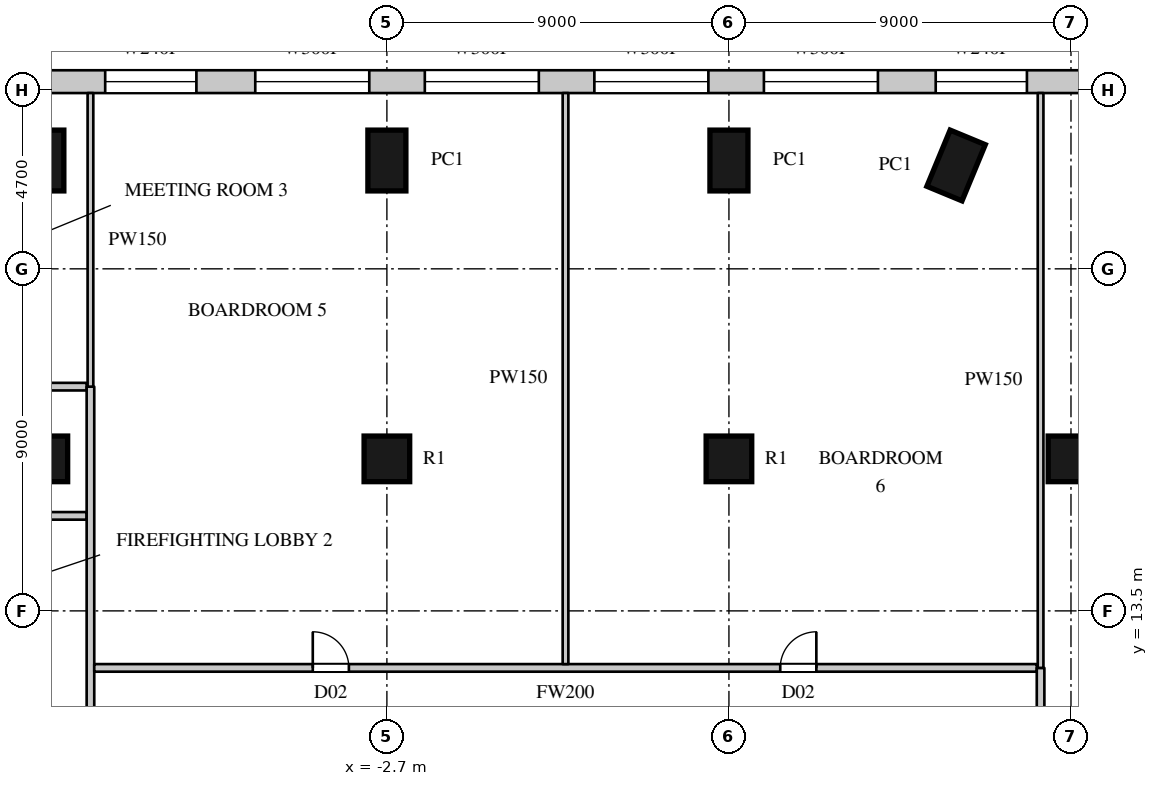
"""IFC4 building model, lengths in metres.
Left out: names, types, materials, properties, quantities, classifications, styles, units other than length and angle.
Written with IfcOpenShell. Run it as: python <this file> out.ifc"""

import sys

from ifc_helpers import new_model, si_unit, direction, frame, frame_2d, origin, origin_2d, place, context, subcontext, project, spatial, rectangle, circle, extrude, element, fill, save


model = new_model("IFC4")
c1 = context("Model", 3, precision=1e-05, world=origin(), true_north=direction((0.0, 1.0)))
c2 = subcontext(c1, "Body", "Model", "MODEL_VIEW")
j1 = project(units=[si_unit("LENGTHUNIT", "METRE"), si_unit("PLANEANGLEUNIT", "RADIAN")], contexts=[c1])
p1 = place(None, origin())
s1 = spatial("IfcSite", under=j1, at=p1, CompositionType="ELEMENT")
p2 = place(p1, origin())
s2 = spatial("IfcBuilding", under=s1, at=p2, CompositionType="ELEMENT")
p3 = place(p2, frame((0.0, 0.0, 44.0)))
s3 = spatial("IfcBuildingStorey", under=s2, at=p3, CompositionType="ELEMENT", Elevation=44.0)
for number, where, z_axis, x_axis in (
    (1, (12.277, 25.219, 0.0), (0.0, 0.0, 1.0), (-0.924, 0.383, 0.0)),
    (2, (6.3, 25.35, 0.0), (0.0, 0.0, 1.0), (-1.0, 0.0, 0.0)),
    (3, (-2.7, 25.35, 0.0), (0.0, 0.0, 1.0), (-1.0, 0.0, 0.0)),
    (4, (-11.7, 25.35, 0.0), (0.0, 0.0, 1.0), (-1.0, 0.0, 0.0)),
):
    element("IfcColumn", number, at=place(p3, frame(where, z_axis=z_axis, x_axis=x_axis)), inside=s3, PredefinedType="COLUMN", context=c2, shape_type="SweptSolid", body=[
        extrude(rectangle(XDim=1.0, YDim=1.6, at=origin_2d()), origin(), (0.0, 0.0, 1.0), 6.0),
    ])
for number, where, z_axis, x_axis in (
    (5, (-11.7, 17.5, 0.0), (0.0, 0.0, 1.0), (1.0, 0.0, 0.0)),
    (6, (-2.7, 17.5, 0.0), (0.0, 0.0, 1.0), (1.0, 0.0, 0.0)),
    (7, (6.3, 17.5, 0.0), (0.0, 0.0, 1.0), (1.0, 0.0, 0.0)),
    (8, (15.3, 17.5, 0.0), (0.0, 0.0, 1.0), (1.0, 0.0, 0.0)),
):
    element("IfcColumn", number, at=place(p3, frame(where, z_axis=z_axis, x_axis=x_axis)), inside=s3, PredefinedType="COLUMN", context=c2, shape_type="SweptSolid", body=[
        extrude(circle(Radius=0.6, at=origin_2d()), origin(), (0.0, 0.0, 1.0), 6.0),
    ])
p4 = place(p3, frame((24.334, 27.425, 0.0), z_axis=(0.0, 0.0, 1.0), x_axis=(-1.0, 0.0, 0.0)))
e9 = element("IfcWall", 9, at=p4, inside=s3, PredefinedType="ELEMENTEDWALL", context=c2, shape_type="SweptSolid", body=[
    extrude(rectangle(XDim=53.534, YDim=0.6, at=frame_2d((26.767, 0.0))), origin(), (0.0, 0.0, 1.0), 5.596),
])
p5 = place(p4, frame((0.731, 0.0, 1.2)))
e10 = element("IfcOpeningElement", 10, at=p5, cuts=e9, PredefinedType="OPENING", context=c2, shape_type="SweptSolid", body=[
    extrude(rectangle(XDim=3.0, YDim=2.4, at=frame_2d((1.5, 1.2))), frame((0.0, 0.31, 0.0), z_axis=(0.0, -1.0, 0.0), x_axis=(1.0, 0.0, 0.0)), (0.0, 0.0, 1.0), 0.62),
])
p6 = place(p4, frame((5.192, 0.0, 1.2)))
e11 = element("IfcOpeningElement", 11, at=p6, cuts=e9, PredefinedType="OPENING", context=c2, shape_type="SweptSolid", body=[
    extrude(rectangle(XDim=3.0, YDim=2.4, at=frame_2d((1.5, 1.2))), frame((0.0, 0.31, 0.0), z_axis=(0.0, -1.0, 0.0), x_axis=(1.0, 0.0, 0.0)), (0.0, 0.0, 1.0), 0.62),
])
p7 = place(p4, frame((14.114, 0.0, 1.2)))
e12 = element("IfcOpeningElement", 12, at=p7, cuts=e9, PredefinedType="OPENING", context=c2, shape_type="SweptSolid", body=[
    extrude(rectangle(XDim=3.0, YDim=2.4, at=frame_2d((1.5, 1.2))), frame((0.0, 0.31, 0.0), z_axis=(0.0, -1.0, 0.0), x_axis=(1.0, 0.0, 0.0)), (0.0, 0.0, 1.0), 0.62),
])
p8 = place(p4, frame((18.575, 0.0, 1.2)))
e13 = element("IfcOpeningElement", 13, at=p8, cuts=e9, PredefinedType="OPENING", context=c2, shape_type="SweptSolid", body=[
    extrude(rectangle(XDim=3.0, YDim=2.4, at=frame_2d((1.5, 1.2))), frame((0.0, 0.31, 0.0), z_axis=(0.0, -1.0, 0.0), x_axis=(1.0, 0.0, 0.0)), (0.0, 0.0, 1.0), 0.62),
])
p9 = place(p4, frame((23.037, 0.0, 1.2)))
e14 = element("IfcOpeningElement", 14, at=p9, cuts=e9, PredefinedType="OPENING", context=c2, shape_type="SweptSolid", body=[
    extrude(rectangle(XDim=3.0, YDim=2.4, at=frame_2d((1.5, 1.2))), frame((0.0, 0.31, 0.0), z_axis=(0.0, -1.0, 0.0), x_axis=(1.0, 0.0, 0.0)), (0.0, 0.0, 1.0), 0.62),
])
p10 = place(p4, frame((27.498, 0.0, 1.2)))
e15 = element("IfcOpeningElement", 15, at=p10, cuts=e9, PredefinedType="OPENING", context=c2, shape_type="SweptSolid", body=[
    extrude(rectangle(XDim=3.0, YDim=2.4, at=frame_2d((1.5, 1.2))), frame((0.0, 0.31, 0.0), z_axis=(0.0, -1.0, 0.0), x_axis=(1.0, 0.0, 0.0)), (0.0, 0.0, 1.0), 0.62),
])
p11 = place(p4, frame((45.343, 0.0, 1.2)))
e16 = element("IfcOpeningElement", 16, at=p11, cuts=e9, PredefinedType="OPENING", context=c2, shape_type="SweptSolid", body=[
    extrude(rectangle(XDim=3.0, YDim=2.4, at=frame_2d((1.5, 1.2))), frame((0.0, 0.31, 0.0), z_axis=(0.0, -1.0, 0.0), x_axis=(1.0, 0.0, 0.0)), (0.0, 0.0, 1.0), 0.62),
])
p12 = place(p4, frame((49.804, 0.0, 1.2)))
e17 = element("IfcOpeningElement", 17, at=p12, cuts=e9, PredefinedType="OPENING", context=c2, shape_type="SweptSolid", body=[
    extrude(rectangle(XDim=3.0, YDim=2.4, at=frame_2d((1.5, 1.2))), frame((0.0, 0.31, 0.0), z_axis=(0.0, -1.0, 0.0), x_axis=(1.0, 0.0, 0.0)), (0.0, 0.0, 1.0), 0.62),
])
p13 = place(p4, frame((10.194, 0.0, 1.2)))
e18 = element("IfcOpeningElement", 18, at=p13, cuts=e9, PredefinedType="OPENING", context=c2, shape_type="SweptSolid", body=[
    extrude(rectangle(XDim=2.4, YDim=2.4, at=frame_2d((1.2, 1.2))), frame((0.0, 0.31, 0.0), z_axis=(0.0, -1.0, 0.0), x_axis=(1.0, 0.0, 0.0)), (0.0, 0.0, 1.0), 0.62),
])
p14 = place(p4, frame((32.047, 0.0, 1.2)))
e19 = element("IfcOpeningElement", 19, at=p14, cuts=e9, PredefinedType="OPENING", context=c2, shape_type="SweptSolid", body=[
    extrude(rectangle(XDim=2.4, YDim=2.4, at=frame_2d((1.2, 1.2))), frame((0.0, 0.31, 0.0), z_axis=(0.0, -1.0, 0.0), x_axis=(1.0, 0.0, 0.0)), (0.0, 0.0, 1.0), 0.62),
])
p15 = place(p4, frame((36.461, 0.0, 1.2)))
e20 = element("IfcOpeningElement", 20, at=p15, cuts=e9, PredefinedType="OPENING", context=c2, shape_type="SweptSolid", body=[
    extrude(rectangle(XDim=1.2, YDim=2.4, at=frame_2d((0.6, 1.2))), frame((0.0, 0.31, 0.0), z_axis=(0.0, -1.0, 0.0), x_axis=(1.0, 0.0, 0.0)), (0.0, 0.0, 1.0), 0.62),
])
p16 = place(p4, frame((38.411, 0.0, 1.2)))
e21 = element("IfcOpeningElement", 21, at=p16, cuts=e9, PredefinedType="OPENING", context=c2, shape_type="SweptSolid", body=[
    extrude(rectangle(XDim=0.9, YDim=2.4, at=frame_2d((0.45, 1.2))), frame((0.0, 0.31, 0.0), z_axis=(0.0, -1.0, 0.0), x_axis=(1.0, 0.0, 0.0)), (0.0, 0.0, 1.0), 0.62),
])
p17 = place(p4, frame((41.475, 0.0, 1.2)))
e22 = element("IfcOpeningElement", 22, at=p17, cuts=e9, PredefinedType="OPENING", context=c2, shape_type="SweptSolid", body=[
    extrude(rectangle(XDim=2.4, YDim=2.4, at=frame_2d((1.2, 1.2))), frame((0.0, 0.31, 0.0), z_axis=(0.0, -1.0, 0.0), x_axis=(1.0, 0.0, 0.0)), (0.0, 0.0, 1.0), 0.62),
])
p18 = place(p3, frame((-23.687, 19.4, 0.0), z_axis=(0.0, 0.0, 1.0), x_axis=(1.0, 0.0, 0.0)))
e23 = element("IfcWall", 23, at=p18, inside=s3, PredefinedType="PARTITIONING", context=c2, shape_type="SweptSolid", body=[
    extrude(rectangle(XDim=13.086, YDim=0.2, at=frame_2d((6.543, 0.0))), origin(), (0.0, 0.0, 1.0), 5.596),
])
p19 = place(p18, frame((4.8, 0.0, 0.0)))
e24 = element("IfcOpeningElement", 24, at=p19, cuts=e23, PredefinedType="OPENING", context=c2, shape_type="SweptSolid", body=[
    extrude(rectangle(XDim=0.95, YDim=2.2, at=frame_2d((0.475, 1.1))), frame((0.0, 0.11, 0.0), z_axis=(0.0, -1.0, 0.0), x_axis=(1.0, 0.0, 0.0)), (0.0, 0.0, 1.0), 0.22),
])
p20 = place(p18, frame((7.95, 0.0, 0.0)))
e25 = element("IfcOpeningElement", 25, at=p20, cuts=e23, PredefinedType="OPENING", context=c2, shape_type="SweptSolid", body=[
    extrude(rectangle(XDim=0.95, YDim=2.2, at=frame_2d((0.475, 1.1))), frame((0.0, 0.11, 0.0), z_axis=(0.0, -1.0, 0.0), x_axis=(1.0, 0.0, 0.0)), (0.0, 0.0, 1.0), 0.22),
])
p21 = place(p18, frame((11.0, 0.0, 0.0)))
e26 = element("IfcOpeningElement", 26, at=p21, cuts=e23, PredefinedType="OPENING", context=c2, shape_type="SweptSolid", body=[
    extrude(rectangle(XDim=0.95, YDim=2.2, at=frame_2d((0.475, 1.1))), frame((0.0, 0.11, 0.0), z_axis=(0.0, -1.0, 0.0), x_axis=(1.0, 0.0, 0.0)), (0.0, 0.0, 1.0), 0.22),
])
p22 = place(p3, frame((-13.97, 16.0, 0.0), z_axis=(0.0, 0.0, 1.0), x_axis=(1.0, 0.0, 0.0)))
e27 = element("IfcWall", 27, at=p22, inside=s3, PredefinedType="PARTITIONING", context=c2, shape_type="SweptSolid", body=[
    extrude(rectangle(XDim=3.37, YDim=0.2, at=frame_2d((1.685, 0.0))), origin(), (0.0, 0.0, 1.0), 5.596),
])
p23 = place(p3, frame((-10.5, -19.4, 0.0), z_axis=(0.0, 0.0, 1.0), x_axis=(0.0, 1.0, 0.0)))
e28 = element("IfcWall", 28, at=p23, inside=s3, PredefinedType="PARTITIONING", context=c2, shape_type="SweptSolid", body=[
    extrude(rectangle(XDim=38.8, YDim=0.2, at=frame_2d((19.4, 0.0))), origin(), (0.0, 0.0, 1.0), 5.596),
])
p24 = place(p23, frame((18.65, 0.0, 0.0)))
e29 = element("IfcOpeningElement", 29, at=p24, cuts=e28, PredefinedType="OPENING", context=c2, shape_type="SweptSolid", body=[
    extrude(rectangle(XDim=1.5, YDim=2.4, at=frame_2d((0.75, 1.2))), frame((0.0, 0.11, 0.0), z_axis=(0.0, -1.0, 0.0), x_axis=(1.0, 0.0, 0.0)), (0.0, 0.0, 1.0), 0.22),
])
p25 = place(p3, frame((-10.4, 12.0, 0.0), z_axis=(0.0, 0.0, 1.0), x_axis=(1.0, 0.0, 0.0)))
e30 = element("IfcWall", 30, at=p25, inside=s3, PredefinedType="PARTITIONING", context=c2, shape_type="SweptSolid", body=[
    extrude(rectangle(XDim=24.8, YDim=0.2, at=frame_2d((12.4, 0.0))), origin(), (0.0, 0.0, 1.0), 5.596),
])
p26 = place(p25, frame((5.75, 0.0, 0.0)))
e31 = element("IfcOpeningElement", 31, at=p26, cuts=e30, PredefinedType="OPENING", context=c2, shape_type="SweptSolid", body=[
    extrude(rectangle(XDim=0.95, YDim=2.2, at=frame_2d((0.475, 1.1))), frame((0.0, 0.11, 0.0), z_axis=(0.0, -1.0, 0.0), x_axis=(1.0, 0.0, 0.0)), (0.0, 0.0, 1.0), 0.22),
])
p27 = place(p25, frame((18.05, 0.0, 0.0)))
e32 = element("IfcOpeningElement", 32, at=p27, cuts=e30, PredefinedType="OPENING", context=c2, shape_type="SweptSolid", body=[
    extrude(rectangle(XDim=0.95, YDim=2.2, at=frame_2d((0.475, 1.1))), frame((0.0, 0.11, 0.0), z_axis=(0.0, -1.0, 0.0), x_axis=(1.0, 0.0, 0.0)), (0.0, 0.0, 1.0), 0.22),
])
p28 = place(p3, frame((14.5, 8.1, 0.0), z_axis=(0.0, 0.0, 1.0), x_axis=(0.0, 1.0, 0.0)))
e33 = element("IfcWall", 33, at=p28, inside=s3, PredefinedType="PARTITIONING", context=c2, shape_type="SweptSolid", body=[
    extrude(rectangle(XDim=3.9, YDim=0.2, at=frame_2d((1.95, 0.0))), origin(), (0.0, 0.0, 1.0), 5.596),
])
p29 = place(p28, frame((1.15, 0.0, 0.0)))
e34 = element("IfcOpeningElement", 34, at=p29, cuts=e33, PredefinedType="OPENING", context=c2, shape_type="SweptSolid", body=[
    extrude(rectangle(XDim=1.6, YDim=2.4, at=frame_2d((0.8, 1.2))), frame((0.0, 0.11, 0.0), z_axis=(0.0, -1.0, 0.0), x_axis=(1.0, 0.0, 0.0)), (0.0, 0.0, 1.0), 0.22),
])
p30 = place(p3, frame((-10.5, 19.4, 0.0), z_axis=(0.0, 0.0, 1.0), x_axis=(0.0, 1.0, 0.0)))
e35 = element("IfcWall", 35, at=p30, inside=s3, PredefinedType="PARTITIONING", context=c2, shape_type="SweptSolid", body=[
    extrude(rectangle(XDim=7.725, YDim=0.15, at=frame_2d((3.863, 0.0))), origin(), (0.0, 0.0, 1.0), 5.596),
])
p31 = place(p3, frame((2.0, 12.1, 0.0), z_axis=(0.0, 0.0, 1.0), x_axis=(0.0, 1.0, 0.0)))
e36 = element("IfcWall", 36, at=p31, inside=s3, PredefinedType="PARTITIONING", context=c2, shape_type="SweptSolid", body=[
    extrude(rectangle(XDim=15.025, YDim=0.15, at=frame_2d((7.512, 0.0))), origin(), (0.0, 0.0, 1.0), 5.596),
])
p32 = place(p3, frame((14.5, 12.0, 0.0), z_axis=(0.0, 0.0, 1.0), x_axis=(0.0, 1.0, 0.0)))
e37 = element("IfcWall", 37, at=p32, inside=s3, PredefinedType="PARTITIONING", context=c2, shape_type="SweptSolid", body=[
    extrude(rectangle(XDim=15.125, YDim=0.15, at=frame_2d((7.562, 0.0))), origin(), (0.0, 0.0, 1.0), 5.596),
])
p33 = place(p7, origin())
e38 = element("IfcWindow", 38, at=p33, inside=s3, PartitioningType="SINGLE_PANEL", PredefinedType="WINDOW", context=c2, shape_type="SweptSolid", body=[
    extrude(rectangle(XDim=3.0, YDim=2.4, at=frame_2d((1.5, 1.2))), frame((0.0, 0.06, 0.0), z_axis=(0.0, -1.0, 0.0), x_axis=(1.0, 0.0, 0.0)), (0.0, 0.0, 1.0), 0.06),
])
fill(e12, e38)
p34 = place(p8, origin())
e39 = element("IfcWindow", 39, at=p34, inside=s3, PartitioningType="SINGLE_PANEL", PredefinedType="WINDOW", context=c2, shape_type="SweptSolid", body=[
    extrude(rectangle(XDim=3.0, YDim=2.4, at=frame_2d((1.5, 1.2))), frame((0.0, 0.06, 0.0), z_axis=(0.0, -1.0, 0.0), x_axis=(1.0, 0.0, 0.0)), (0.0, 0.0, 1.0), 0.06),
])
fill(e13, e39)
p35 = place(p9, origin())
e40 = element("IfcWindow", 40, at=p35, inside=s3, PartitioningType="SINGLE_PANEL", PredefinedType="WINDOW", context=c2, shape_type="SweptSolid", body=[
    extrude(rectangle(XDim=3.0, YDim=2.4, at=frame_2d((1.5, 1.2))), frame((0.0, 0.06, 0.0), z_axis=(0.0, -1.0, 0.0), x_axis=(1.0, 0.0, 0.0)), (0.0, 0.0, 1.0), 0.06),
])
fill(e14, e40)
p36 = place(p10, origin())
e41 = element("IfcWindow", 41, at=p36, inside=s3, PartitioningType="SINGLE_PANEL", PredefinedType="WINDOW", context=c2, shape_type="SweptSolid", body=[
    extrude(rectangle(XDim=3.0, YDim=2.4, at=frame_2d((1.5, 1.2))), frame((0.0, 0.06, 0.0), z_axis=(0.0, -1.0, 0.0), x_axis=(1.0, 0.0, 0.0)), (0.0, 0.0, 1.0), 0.06),
])
fill(e15, e41)
p37 = place(p26, origin())
e42 = element("IfcDoor", 42, at=p37, inside=s3, OperationType="SINGLE_SWING_LEFT", PredefinedType="DOOR", context=c2, shape_type="SweptSolid", body=[
    extrude(rectangle(XDim=0.95, YDim=2.2, at=frame_2d((0.475, 1.1))), frame((0.0, 0.025, 0.0), z_axis=(0.0, -1.0, 0.0), x_axis=(1.0, 0.0, 0.0)), (0.0, 0.0, 1.0), 0.05),
])
fill(e31, e42)
p38 = place(p27, origin())
e43 = element("IfcDoor", 43, at=p38, inside=s3, OperationType="SINGLE_SWING_RIGHT", PredefinedType="DOOR", context=c2, shape_type="SweptSolid", body=[
    extrude(rectangle(XDim=0.95, YDim=2.2, at=frame_2d((0.475, 1.1))), frame((0.0, 0.025, 0.0), z_axis=(0.0, -1.0, 0.0), x_axis=(1.0, 0.0, 0.0)), (0.0, 0.0, 1.0), 0.05),
])
fill(e32, e43)
p39 = place(p13, origin())
e44 = element("IfcWindow", 44, at=p39, inside=s3, PartitioningType="SINGLE_PANEL", PredefinedType="WINDOW", context=c2, shape_type="SweptSolid", body=[
    extrude(rectangle(XDim=2.4, YDim=2.4, at=frame_2d((1.2, 1.2))), frame((0.0, 0.06, 0.0), z_axis=(0.0, -1.0, 0.0), x_axis=(1.0, 0.0, 0.0)), (0.0, 0.0, 1.0), 0.06),
])
fill(e18, e44)
p40 = place(p14, origin())
e45 = element("IfcWindow", 45, at=p40, inside=s3, PartitioningType="SINGLE_PANEL", PredefinedType="WINDOW", context=c2, shape_type="SweptSolid", body=[
    extrude(rectangle(XDim=2.4, YDim=2.4, at=frame_2d((1.2, 1.2))), frame((0.0, 0.06, 0.0), z_axis=(0.0, -1.0, 0.0), x_axis=(1.0, 0.0, 0.0)), (0.0, 0.0, 1.0), 0.06),
])
fill(e19, e45)
save(model, sys.argv[1])
